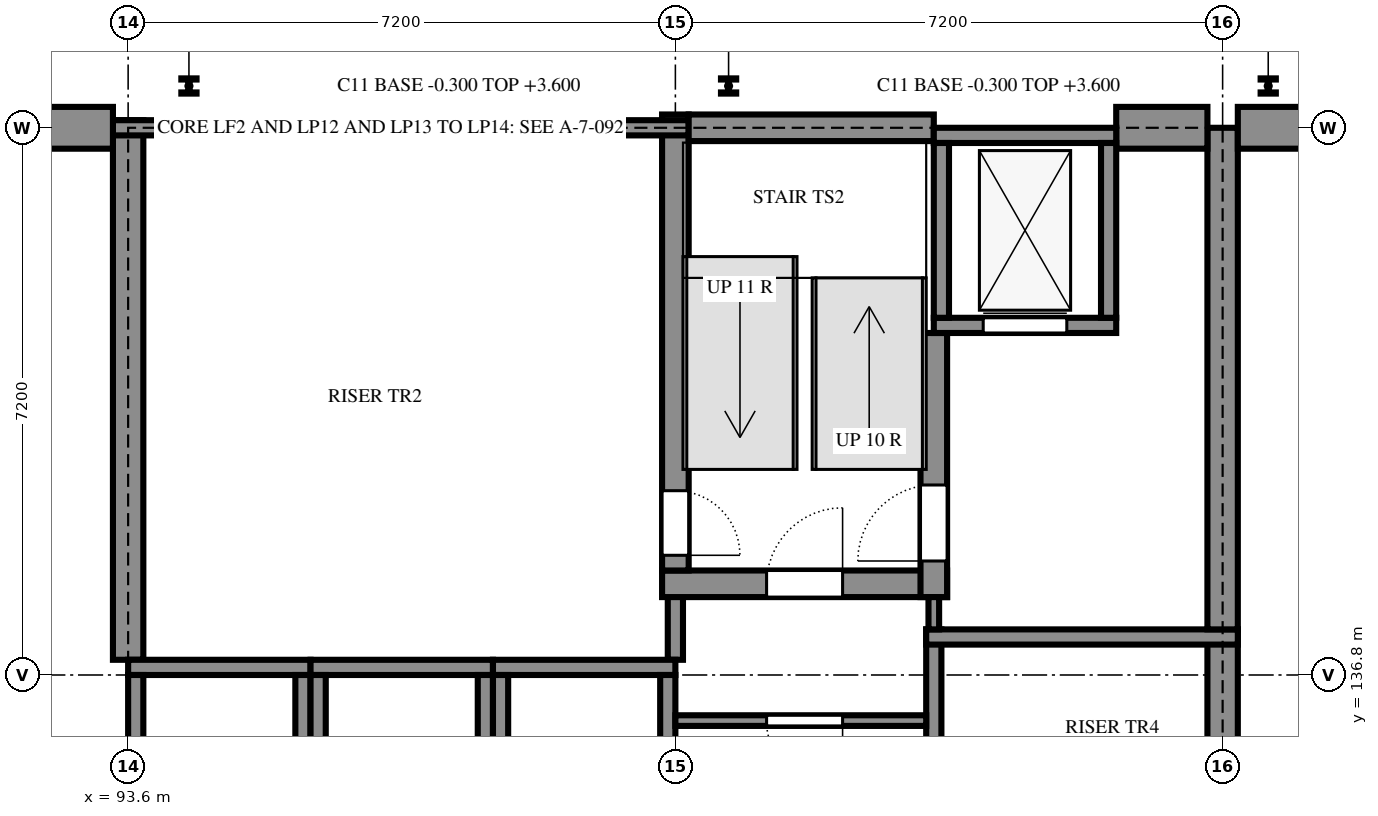
"""IFC4 building model, lengths in metres.
Left out: names, types, materials, properties, quantities, classifications, styles, units other than length and angle.
Written with IfcOpenShell. Run it as: python <this file> out.ifc"""

import sys

from ifc_helpers import new_model, si_unit, direction, frame, frame_2d, origin, origin_2d, place, context, subcontext, project, spatial, rectangle, i_section, extrude, element, fill, save


model = new_model("IFC4")
c1 = context("Model", 3, precision=1e-05, world=origin(), true_north=direction((0.0, 1.0)))
c2 = subcontext(c1, "Body", "Model", "MODEL_VIEW")
j1 = project(units=[si_unit("LENGTHUNIT", "METRE"), si_unit("PLANEANGLEUNIT", "RADIAN")], contexts=[c1])
p1 = place(None, origin())
s1 = spatial("IfcSite", under=j1, at=p1, CompositionType="ELEMENT")
p2 = place(p1, origin())
s2 = spatial("IfcBuilding", under=s1, at=p2, CompositionType="ELEMENT")
p3 = place(p2, origin())
s3 = spatial("IfcBuildingStorey", under=s2, at=p3, CompositionType="ELEMENT", Elevation=0.0)
p4 = place(p3, frame((108.0, 134.5, 0.0), z_axis=(0.0, 0.0, 1.0), x_axis=(0.0, 1.0, 0.0)))
e1 = element("IfcWall", 1, at=p4, inside=s3, PredefinedType="SHEAR", context=c2, shape_type="SweptSolid", body=[
    extrude(rectangle(XDim=2.9, YDim=0.4, at=frame_2d((1.45, 0.0))), origin(), (0.0, 0.0, 1.0), 3.6),
])
p5 = place(p3, frame((100.8, 137.0, 0.0), z_axis=(0.0, 0.0, 1.0), x_axis=(0.0, 1.0, 0.0)))
e2 = element("IfcWall", 2, at=p5, inside=s3, PredefinedType="SHEAR", context=c2, shape_type="SweptSolid", body=[
    extrude(rectangle(XDim=1.175, YDim=0.2, at=frame_2d((0.587, 0.0))), origin(), (0.0, 0.0, 1.0), 3.6),
])
p6 = place(p3, frame((104.2, 137.4, 0.0), z_axis=(0.0, 0.0, 1.0), x_axis=(0.0, -1.0, 0.0)))
e3 = element("IfcWall", 3, at=p6, inside=s3, PredefinedType="SHEAR", context=c2, shape_type="SweptSolid", body=[
    extrude(rectangle(XDim=3.1, YDim=0.2, at=frame_2d((1.55, 0.0))), origin(), (0.0, 0.0, 1.0), 3.6),
])
p7 = place(p3, frame((108.2, 137.3, 0.0), z_axis=(0.0, 0.0, 1.0), x_axis=(-1.0, 0.0, 0.0)))
e4 = element("IfcWall", 4, at=p7, inside=s3, PredefinedType="SHEAR", context=c2, shape_type="SweptSolid", body=[
    extrude(rectangle(XDim=4.1, YDim=0.2, at=frame_2d((2.05, 0.0))), origin(), (0.0, 0.0, 1.0), 3.6),
])
p8 = place(p3, frame((108.0, 137.4, 0.0), z_axis=(0.0, 0.0, 1.0), x_axis=(0.0, 1.0, 0.0)))
e5 = element("IfcWall", 5, at=p8, inside=s3, PredefinedType="SHEAR", context=c2, shape_type="SweptSolid", body=[
    extrude(rectangle(XDim=6.6, YDim=0.4, at=frame_2d((3.3, 0.0))), origin(), (0.0, 0.0, 1.0), 3.6),
])
p9 = place(p3, frame((100.625, 138.0, 0.0), z_axis=(0.0, 0.0, 1.0), x_axis=(1.0, 0.0, 0.0)))
e6 = element("IfcWall", 6, at=p9, inside=s3, PredefinedType="SHEAR", context=c2, shape_type="SweptSolid", body=[
    extrude(rectangle(XDim=3.75, YDim=0.35, at=frame_2d((1.875, 0.0))), origin(), (0.0, 0.0, 1.0), 3.6),
])
p10 = place(p9, frame((1.375, 0.0, 0.0)))
e7 = element("IfcOpeningElement", 7, at=p10, cuts=e6, PredefinedType="OPENING", context=c2, shape_type="SweptSolid", body=[
    extrude(rectangle(XDim=1.0, YDim=2.1, at=frame_2d((0.5, 1.05))), frame((0.0, 0.185, 0.0), z_axis=(0.0, -1.0, 0.0), x_axis=(1.0, 0.0, 0.0)), (0.0, 0.0, 1.0), 0.37),
])
p11 = place(p3, frame((104.2, 137.825, 0.0), z_axis=(0.0, 0.0, 1.0), x_axis=(0.0, 1.0, 0.0)))
e8 = element("IfcWall", 8, at=p11, inside=s3, PredefinedType="SHEAR", context=c2, shape_type="SweptSolid", body=[
    extrude(rectangle(XDim=3.475, YDim=0.35, at=frame_2d((1.738, 0.0))), origin(), (0.0, 0.0, 1.0), 3.6),
])
p12 = place(p11, frame((0.475, 0.0, 0.0)))
e9 = element("IfcOpeningElement", 9, at=p12, cuts=e8, PredefinedType="OPENING", context=c2, shape_type="SweptSolid", body=[
    extrude(rectangle(XDim=1.0, YDim=2.1, at=frame_2d((0.5, 1.05))), frame((0.0, 0.185, 0.0), z_axis=(0.0, -1.0, 0.0), x_axis=(1.0, 0.0, 0.0)), (0.0, 0.0, 1.0), 0.37),
])
p13 = place(p3, frame((93.6, 144.1, 0.0), z_axis=(0.0, 0.0, 1.0), x_axis=(0.0, -1.0, 0.0)))
e10 = element("IfcWall", 10, at=p13, inside=s3, PredefinedType="SHEAR", context=c2, shape_type="SweptSolid", body=[
    extrude(rectangle(XDim=7.1, YDim=0.4, at=frame_2d((3.55, 0.0))), origin(), (0.0, 0.0, 1.0), 3.6),
])
p14 = place(p3, frame((100.8, 144.175, 0.0), z_axis=(0.0, 0.0, 1.0), x_axis=(0.0, -1.0, 0.0)))
e11 = element("IfcWall", 11, at=p14, inside=s3, PredefinedType="SHEAR", context=c2, shape_type="SweptSolid", body=[
    extrude(rectangle(XDim=6.0, YDim=0.35, at=frame_2d((3.0, 0.0))), origin(), (0.0, 0.0, 1.0), 3.6),
])
p15 = place(p14, frame((4.95, 0.0, 0.0)))
e12 = element("IfcOpeningElement", 12, at=p15, cuts=e11, PredefinedType="OPENING", context=c2, shape_type="SweptSolid", body=[
    extrude(rectangle(XDim=0.85, YDim=2.1, at=frame_2d((0.425, 1.05))), frame((0.0, 0.185, 0.0), z_axis=(0.0, -1.0, 0.0), x_axis=(1.0, 0.0, 0.0)), (0.0, 0.0, 1.0), 0.37),
])
p16 = place(p3, frame((100.975, 144.0, 0.0), z_axis=(0.0, 0.0, 1.0), x_axis=(-1.0, 0.0, 0.0)))
e13 = element("IfcWall", 13, at=p16, inside=s3, PredefinedType="SHEAR", context=c2, shape_type="SweptSolid", body=[
    extrude(rectangle(XDim=7.575, YDim=0.2, at=frame_2d((3.788, 0.0))), origin(), (0.0, 0.0, 1.0), 3.6),
])
p17 = place(p3, frame((104.2, 144.0, 0.0), z_axis=(0.0, 0.0, 1.0), x_axis=(-1.0, 0.0, 0.0)))
e14 = element("IfcWall", 14, at=p17, inside=s3, PredefinedType="SHEAR", context=c2, shape_type="SweptSolid", body=[
    extrude(rectangle(XDim=3.225, YDim=0.35, at=frame_2d((1.612, 0.0))), origin(), (0.0, 0.0, 1.0), 3.6),
])
p18 = place(p3, frame((68.35, 144.0, 0.0), z_axis=(0.0, 0.0, 1.0), x_axis=(1.0, 0.0, 0.0)))
e15 = element("IfcWall", 15, at=p18, inside=s3, PredefinedType="SOLIDWALL", context=c2, shape_type="SweptSolid", body=[
    extrude(rectangle(XDim=25.05, YDim=0.55, at=frame_2d((12.525, 0.0))), origin(), (0.0, 0.0, 1.0), 3.6),
])
p19 = place(p3, frame((106.6, 144.0, 0.0), z_axis=(0.0, 0.0, 1.0), x_axis=(1.0, 0.0, 0.0)))
e16 = element("IfcWall", 16, at=p19, inside=s3, PredefinedType="SOLIDWALL", context=c2, shape_type="SweptSolid", body=[
    extrude(rectangle(XDim=1.2, YDim=0.55, at=frame_2d((0.6, 0.0))), origin(), (0.0, 0.0, 1.0), 3.6),
])
p20 = place(p3, frame((108.2, 144.0, 0.0), z_axis=(0.0, 0.0, 1.0), x_axis=(1.0, 0.0, 0.0)))
e17 = element("IfcWall", 17, at=p20, inside=s3, PredefinedType="SOLIDWALL", context=c2, shape_type="SweptSolid", body=[
    extrude(rectangle(XDim=25.05, YDim=0.55, at=frame_2d((12.525, 0.0))), origin(), (0.0, 0.0, 1.0), 3.6),
])
p21 = place(p3, frame((93.6, 136.9, 0.0), z_axis=(0.0, 0.0, 1.0), x_axis=(1.0, 0.0, 0.0)))
e18 = element("IfcWall", 18, at=p21, inside=s3, PredefinedType="SHEAR", context=c2, shape_type="SweptSolid", body=[
    extrude(rectangle(XDim=2.4, YDim=0.2, at=frame_2d((1.2, 0.0))), origin(), (0.0, 0.0, 1.0), 3.6),
])
for number, where, z_axis, x_axis in (
    (19, (93.7, 134.6, 0.0), (0.0, 0.0, 1.0), (0.0, 1.0, 0.0)),
    (20, (95.9, 134.6, 0.0), (0.0, 0.0, 1.0), (0.0, 1.0, 0.0)),
):
    element("IfcWall", number, at=place(p3, frame(where, z_axis=z_axis, x_axis=x_axis)), inside=s3, PredefinedType="SHEAR", context=c2, shape_type="SweptSolid", body=[
        extrude(rectangle(XDim=2.2, YDim=0.2, at=frame_2d((1.1, 0.0))), origin(), (0.0, 0.0, 1.0), 3.6),
    ])
p22 = place(p3, frame((96.0, 136.9, 0.0), z_axis=(0.0, 0.0, 1.0), x_axis=(1.0, 0.0, 0.0)))
e21 = element("IfcWall", 21, at=p22, inside=s3, PredefinedType="SHEAR", context=c2, shape_type="SweptSolid", body=[
    extrude(rectangle(XDim=2.4, YDim=0.2, at=frame_2d((1.2, 0.0))), origin(), (0.0, 0.0, 1.0), 3.6),
])
for number, where, z_axis, x_axis in (
    (22, (96.1, 134.6, 0.0), (0.0, 0.0, 1.0), (0.0, 1.0, 0.0)),
    (23, (98.3, 134.6, 0.0), (0.0, 0.0, 1.0), (0.0, 1.0, 0.0)),
):
    element("IfcWall", number, at=place(p3, frame(where, z_axis=z_axis, x_axis=x_axis)), inside=s3, PredefinedType="SHEAR", context=c2, shape_type="SweptSolid", body=[
        extrude(rectangle(XDim=2.2, YDim=0.2, at=frame_2d((1.1, 0.0))), origin(), (0.0, 0.0, 1.0), 3.6),
    ])
p23 = place(p3, frame((98.4, 136.9, 0.0), z_axis=(0.0, 0.0, 1.0), x_axis=(1.0, 0.0, 0.0)))
e24 = element("IfcWall", 24, at=p23, inside=s3, PredefinedType="SHEAR", context=c2, shape_type="SweptSolid", body=[
    extrude(rectangle(XDim=2.4, YDim=0.2, at=frame_2d((1.2, 0.0))), origin(), (0.0, 0.0, 1.0), 3.6),
])
for number, where, z_axis, x_axis in (
    (25, (98.5, 134.6, 0.0), (0.0, 0.0, 1.0), (0.0, 1.0, 0.0)),
    (26, (100.7, 134.6, 0.0), (0.0, 0.0, 1.0), (0.0, 1.0, 0.0)),
):
    element("IfcWall", number, at=place(p3, frame(where, z_axis=z_axis, x_axis=x_axis)), inside=s3, PredefinedType="SHEAR", context=c2, shape_type="SweptSolid", body=[
        extrude(rectangle(XDim=2.2, YDim=0.2, at=frame_2d((1.1, 0.0))), origin(), (0.0, 0.0, 1.0), 3.6),
    ])
p24 = place(p3, frame((104.2, 141.4, -1.4), z_axis=(0.0, 0.0, 1.0), x_axis=(1.0, 0.0, 0.0)))
e27 = element("IfcWall", 27, at=p24, inside=s3, PredefinedType="SHEAR", context=c2, shape_type="SweptSolid", body=[
    extrude(rectangle(XDim=2.4, YDim=0.2, at=frame_2d((1.2, 0.0))), origin(), (0.0, 0.0, 1.0), 5.0),
])
p25 = place(p24, frame((0.65, 0.0, 1.4)))
e28 = element("IfcOpeningElement", 28, at=p25, cuts=e27, PredefinedType="OPENING", context=c2, shape_type="SweptSolid", body=[
    extrude(rectangle(XDim=1.1, YDim=2.1, at=frame_2d((0.55, 1.05))), frame((0.0, 0.11, 0.0), z_axis=(0.0, -1.0, 0.0), x_axis=(1.0, 0.0, 0.0)), (0.0, 0.0, 1.0), 0.22),
])
p26 = place(p3, frame((104.2, 143.9, -1.4), z_axis=(0.0, 0.0, 1.0), x_axis=(1.0, 0.0, 0.0)))
e29 = element("IfcWall", 29, at=p26, inside=s3, PredefinedType="SHEAR", context=c2, shape_type="SweptSolid", body=[
    extrude(rectangle(XDim=2.4, YDim=0.2, at=frame_2d((1.2, 0.0))), origin(), (0.0, 0.0, 1.0), 5.0),
])
for number, where, z_axis, x_axis in (
    (30, (104.3, 141.5, -1.4), (0.0, 0.0, 1.0), (0.0, 1.0, 0.0)),
    (31, (106.5, 141.5, -1.4), (0.0, 0.0, 1.0), (0.0, 1.0, 0.0)),
):
    element("IfcWall", number, at=place(p3, frame(where, z_axis=z_axis, x_axis=x_axis)), inside=s3, PredefinedType="SHEAR", context=c2, shape_type="SweptSolid", body=[
        extrude(rectangle(XDim=2.3, YDim=0.2, at=frame_2d((1.15, 0.0))), origin(), (0.0, 0.0, 1.0), 5.0),
    ])
for number, where, z_axis, x_axis in (
    (32, (94.4, 144.55, -0.3), (0.0, 0.0, 1.0), (1.0, 0.0, 0.0)),
    (33, (97.95, 144.55, -0.3), (0.0, 0.0, 1.0), (1.0, 0.0, 0.0)),
    (34, (101.5, 144.55, -0.3), (0.0, 0.0, 1.0), (1.0, 0.0, 0.0)),
    (35, (105.05, 144.55, -0.3), (0.0, 0.0, 1.0), (1.0, 0.0, 0.0)),
    (36, (108.6, 144.55, -0.3), (0.0, 0.0, 1.0), (1.0, 0.0, 0.0)),
):
    element("IfcColumn", number, at=place(p3, frame(where, z_axis=z_axis, x_axis=x_axis)), inside=s3, PredefinedType="COLUMN", context=c2, shape_type="SweptSolid", body=[
        extrude(i_section(OverallWidth=0.2, OverallDepth=0.2, WebThickness=0.009, FlangeThickness=0.015, FilletRadius=0.018, at=origin_2d()), origin(), (0.0, 0.0, 1.0), 3.9),
    ])
p27 = place(p3, frame((100.8, 136.2, 0.0), z_axis=(0.0, 0.0, 1.0), x_axis=(1.0, 0.0, 0.0)))
e37 = element("IfcWall", 37, at=p27, inside=s3, PredefinedType="PARTITIONING", context=c2, shape_type="SweptSolid", body=[
    extrude(rectangle(XDim=3.3, YDim=0.14, at=frame_2d((1.65, 0.0))), origin(), (0.0, 0.0, 1.0), 3.42),
])
p28 = place(p27, frame((1.2, 0.0, 0.0)))
e38 = element("IfcOpeningElement", 38, at=p28, cuts=e37, PredefinedType="OPENING", context=c2, shape_type="SweptSolid", body=[
    extrude(rectangle(XDim=1.0, YDim=2.1, at=frame_2d((0.5, 1.05))), frame((0.0, 0.08, 0.0), z_axis=(0.0, -1.0, 0.0), x_axis=(1.0, 0.0, 0.0)), (0.0, 0.0, 1.0), 0.16),
])
p29 = place(p3, frame((104.2, 137.4, 0.0), z_axis=(0.0, 0.0, 1.0), x_axis=(0.0, 1.0, 0.0)))
e39 = element("IfcWall", 39, at=p29, inside=s3, PredefinedType="PARTITIONING", context=c2, shape_type="SweptSolid", body=[
    extrude(rectangle(XDim=0.425, YDim=0.14, at=frame_2d((0.212, 0.0))), origin(), (0.0, 0.0, 1.0), 3.42),
])
p30 = place(p25, origin())
e40 = element("IfcDoor", 40, at=p30, inside=s3, OperationType="SLIDING_TO_LEFT", PredefinedType="DOOR", context=c2, shape_type="SweptSolid", body=[
    extrude(rectangle(XDim=1.1, YDim=2.1, at=frame_2d((0.55, 1.05))), frame((0.0, 0.025, 0.0), z_axis=(0.0, -1.0, 0.0), x_axis=(1.0, 0.0, 0.0)), (0.0, 0.0, 1.0), 0.05),
])
fill(e28, e40)
p31 = place(p28, frame((1.0, 0.0, 0.0), z_axis=(0.0, 0.0, 1.0), x_axis=(-1.0, 0.0, 0.0)))
e41 = element("IfcDoor", 41, at=p31, inside=s3, OperationType="SINGLE_SWING_RIGHT", PredefinedType="DOOR", context=c2, shape_type="SweptSolid", body=[
    extrude(rectangle(XDim=1.0, YDim=2.1, at=frame_2d((0.5, 1.05))), frame((0.0, 0.025, 0.0), z_axis=(0.0, -1.0, 0.0), x_axis=(1.0, 0.0, 0.0)), (0.0, 0.0, 1.0), 0.05),
])
fill(e38, e41)
p32 = place(p10, origin())
e42 = element("IfcDoor", 42, at=p32, inside=s3, OperationType="SINGLE_SWING_LEFT", PredefinedType="DOOR", context=c2, shape_type="SweptSolid", body=[
    extrude(rectangle(XDim=1.0, YDim=2.1, at=frame_2d((0.5, 1.05))), frame((0.0, 0.025, 0.0), z_axis=(0.0, -1.0, 0.0), x_axis=(1.0, 0.0, 0.0)), (0.0, 0.0, 1.0), 0.05),
])
fill(e7, e42)
p33 = place(p15, origin())
e43 = element("IfcDoor", 43, at=p33, inside=s3, OperationType="SINGLE_SWING_LEFT", PredefinedType="DOOR", context=c2, shape_type="SweptSolid", body=[
    extrude(rectangle(XDim=0.85, YDim=2.1, at=frame_2d((0.425, 1.05))), frame((0.0, 0.025, 0.0), z_axis=(0.0, -1.0, 0.0), x_axis=(1.0, 0.0, 0.0)), (0.0, 0.0, 1.0), 0.05),
])
fill(e12, e43)
p34 = place(p12, origin())
e44 = element("IfcDoor", 44, at=p34, inside=s3, OperationType="SINGLE_SWING_RIGHT", PredefinedType="DOOR", context=c2, shape_type="SweptSolid", body=[
    extrude(rectangle(XDim=1.0, YDim=2.1, at=frame_2d((0.5, 1.05))), frame((0.0, 0.025, 0.0), z_axis=(0.0, -1.0, 0.0), x_axis=(1.0, 0.0, 0.0)), (0.0, 0.0, 1.0), 0.05),
])
fill(e9, e44)
save(model, sys.argv[1])
